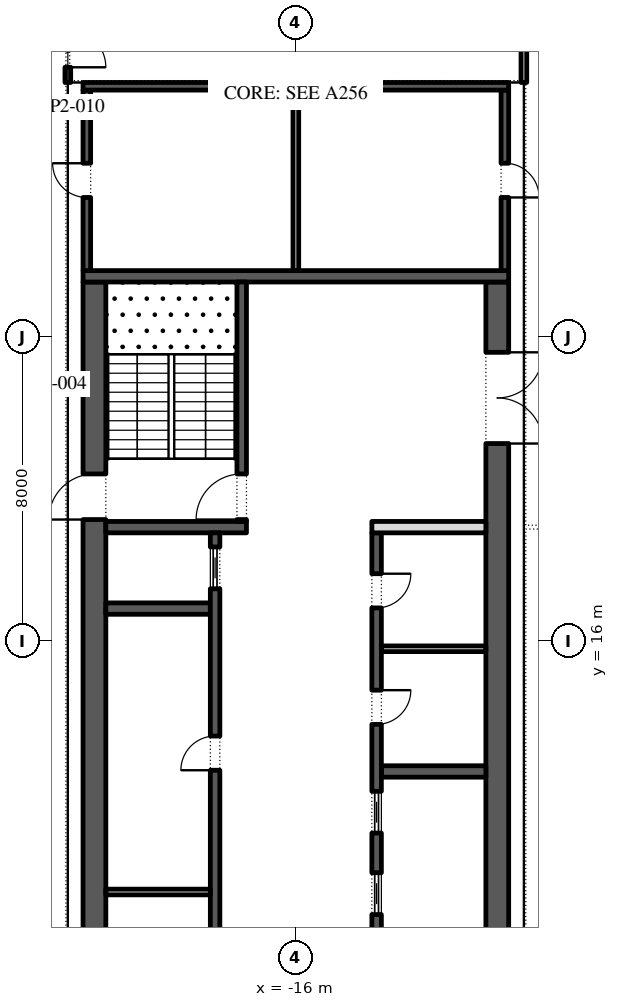
"""IFC4 building model, lengths in metres.
Left out: names, types, materials, properties, quantities, classifications, styles, units other than length and angle.
Written with IfcOpenShell. Run it as: python <this file> out.ifc"""

import sys

from ifc_helpers import new_model, si_unit, direction, frame, frame_2d, origin, place, context, subcontext, project, spatial, rectangle, extrude, element, fill, save


model = new_model("IFC4")
c1 = context("Model", 3, precision=1e-05, world=origin(), true_north=direction((0.0, 1.0)))
c2 = subcontext(c1, "Body", "Model", "MODEL_VIEW")
j1 = project(units=[si_unit("LENGTHUNIT", "METRE"), si_unit("PLANEANGLEUNIT", "RADIAN")], contexts=[c1])
p1 = place(None, origin())
s1 = spatial("IfcSite", under=j1, at=p1, CompositionType="ELEMENT")
p2 = place(p1, origin())
s2 = spatial("IfcBuilding", under=s1, at=p2, CompositionType="ELEMENT")
p3 = place(p2, frame((0.0, 0.0, 247.2)))
s3 = spatial("IfcBuildingStorey", under=s2, at=p3, CompositionType="ELEMENT", Elevation=247.2)
p4 = place(p3, frame((-21.359, 48.678, 0.0), z_axis=(0.0, 0.0, 1.0), x_axis=(-0.224949198343, -0.974370493275, 0.0)))
e1 = element("IfcWall", 1, at=p4, inside=s3, PredefinedType="STANDARD", context=c2, shape_type="SweptSolid", body=[
    extrude(rectangle(XDim=49.5, YDim=0.3, at=frame_2d((24.75, 0.0))), origin(), (0.0, 0.0, 1.0), 4.0),
])
p5 = place(p4, frame((1.157, 0.0, 0.45)))
e2 = element("IfcOpeningElement", 2, at=p5, cuts=e1, PredefinedType="OPENING", context=c2, shape_type="SweptSolid", body=[
    extrude(rectangle(XDim=4.5, YDim=3.05, at=frame_2d((2.25, 1.525))), frame((0.0, 0.16, 0.0), z_axis=(0.0, -1.0, 0.0), x_axis=(1.0, 0.0, 0.0)), (0.0, 0.0, 1.0), 0.32),
])
p6 = place(p4, frame((9.171, 0.0, 0.0)))
e3 = element("IfcOpeningElement", 3, at=p6, cuts=e1, PredefinedType="OPENING", context=c2, shape_type="SweptSolid", body=[
    extrude(rectangle(XDim=2.4, YDim=3.5, at=frame_2d((1.2, 1.75))), frame((0.0, 0.16, 0.0), z_axis=(0.0, -1.0, 0.0), x_axis=(1.0, 0.0, 0.0)), (0.0, 0.0, 1.0), 0.32),
])
p7 = place(p4, frame((15.236, 0.0, 0.45)))
e4 = element("IfcOpeningElement", 4, at=p7, cuts=e1, PredefinedType="OPENING", context=c2, shape_type="SweptSolid", body=[
    extrude(rectangle(XDim=4.5, YDim=3.05, at=frame_2d((2.25, 1.525))), frame((0.0, 0.16, 0.0), z_axis=(0.0, -1.0, 0.0), x_axis=(1.0, 0.0, 0.0)), (0.0, 0.0, 1.0), 0.32),
])
p8 = place(p4, frame((22.35, 0.0, 0.45)))
e5 = element("IfcOpeningElement", 5, at=p8, cuts=e1, PredefinedType="OPENING", context=c2, shape_type="SweptSolid", body=[
    extrude(rectangle(XDim=4.5, YDim=3.05, at=frame_2d((2.25, 1.525))), frame((0.0, 0.16, 0.0), z_axis=(0.0, -1.0, 0.0), x_axis=(1.0, 0.0, 0.0)), (0.0, 0.0, 1.0), 0.32),
])
p9 = place(p4, frame((29.464, 0.0, 0.45)))
e6 = element("IfcOpeningElement", 6, at=p9, cuts=e1, PredefinedType="OPENING", context=c2, shape_type="SweptSolid", body=[
    extrude(rectangle(XDim=4.5, YDim=3.05, at=frame_2d((2.25, 1.525))), frame((0.0, 0.16, 0.0), z_axis=(0.0, -1.0, 0.0), x_axis=(1.0, 0.0, 0.0)), (0.0, 0.0, 1.0), 0.32),
])
p10 = place(p4, frame((37.628, 0.0, 0.0)))
e7 = element("IfcOpeningElement", 7, at=p10, cuts=e1, PredefinedType="OPENING", context=c2, shape_type="SweptSolid", body=[
    extrude(rectangle(XDim=2.4, YDim=3.325, at=frame_2d((1.2, 1.663))), frame((0.0, 0.16, 0.0), z_axis=(0.0, -1.0, 0.0), x_axis=(1.0, 0.0, 0.0)), (0.0, 0.0, 1.0), 0.32),
])
p11 = place(p4, frame((43.693, 0.0, 0.45)))
e8 = element("IfcOpeningElement", 8, at=p11, cuts=e1, PredefinedType="OPENING", context=c2, shape_type="SweptSolid", body=[
    extrude(rectangle(XDim=4.5, YDim=2.825, at=frame_2d((2.25, 1.413))), frame((0.0, 0.16, 0.0), z_axis=(0.0, -1.0, 0.0), x_axis=(1.0, 0.0, 0.0)), (0.0, 0.0, 1.0), 0.32),
])
p12 = place(p3, frame((-21.3, -2.45, 0.0), z_axis=(0.0, 0.0, 1.0), x_axis=(0.0, 1.0, 0.0)))
e9 = element("IfcWall", 9, at=p12, inside=s3, PredefinedType="SHEAR", context=c2, shape_type="SweptSolid", body=[
    extrude(rectangle(XDim=27.9, YDim=0.6, at=frame_2d((13.95, 0.0))), origin(), (0.0, 0.0, 1.0), 4.0),
])
p13 = place(p12, frame((5.05, 0.0, 0.0)))
e10 = element("IfcOpeningElement", 10, at=p13, cuts=e9, PredefinedType="OPENING", context=c2, shape_type="SweptSolid", body=[
    extrude(rectangle(XDim=1.2, YDim=2.1, at=frame_2d((0.6, 1.05))), frame((0.0, 0.31, 0.0), z_axis=(0.0, -1.0, 0.0), x_axis=(1.0, 0.0, 0.0)), (0.0, 0.0, 1.0), 0.62),
])
p14 = place(p12, frame((21.65, 0.0, 0.0)))
e11 = element("IfcOpeningElement", 11, at=p14, cuts=e9, PredefinedType="OPENING", context=c2, shape_type="SweptSolid", body=[
    extrude(rectangle(XDim=1.2, YDim=2.1, at=frame_2d((0.6, 1.05))), frame((0.0, 0.31, 0.0), z_axis=(0.0, -1.0, 0.0), x_axis=(1.0, 0.0, 0.0)), (0.0, 0.0, 1.0), 0.62),
])
p15 = place(p3, frame((-10.7, -2.45, 0.0), z_axis=(0.0, 0.0, 1.0), x_axis=(0.0, 1.0, 0.0)))
e12 = element("IfcWall", 12, at=p15, inside=s3, PredefinedType="SHEAR", context=c2, shape_type="SweptSolid", body=[
    extrude(rectangle(XDim=27.9, YDim=0.6, at=frame_2d((13.95, 0.0))), origin(), (0.0, 0.0, 1.0), 4.0),
])
p16 = place(p15, frame((23.65, 0.0, 0.0)))
e13 = element("IfcOpeningElement", 13, at=p16, cuts=e12, PredefinedType="OPENING", context=c2, shape_type="SweptSolid", body=[
    extrude(rectangle(XDim=2.4, YDim=2.1, at=frame_2d((1.2, 1.05))), frame((0.0, 0.31, 0.0), z_axis=(0.0, -1.0, 0.0), x_axis=(1.0, 0.0, 0.0)), (0.0, 0.0, 1.0), 0.62),
])
p17 = place(p15, frame((1.087, 0.0, 0.0)))
e14 = element("IfcOpeningElement", 14, at=p17, cuts=e12, PredefinedType="OPENING", context=c2, shape_type="SweptSolid", body=[
    extrude(rectangle(XDim=0.9, YDim=2.1, at=frame_2d((0.45, 1.05))), frame((0.0, 0.31, 0.0), z_axis=(0.0, -1.0, 0.0), x_axis=(1.0, 0.0, 0.0)), (0.0, 0.0, 1.0), 0.62),
])
p18 = place(p15, frame((4.262, 0.0, 0.0)))
e15 = element("IfcOpeningElement", 15, at=p18, cuts=e12, PredefinedType="OPENING", context=c2, shape_type="SweptSolid", body=[
    extrude(rectangle(XDim=1.0, YDim=2.1, at=frame_2d((0.5, 1.05))), frame((0.0, 0.31, 0.0), z_axis=(0.0, -1.0, 0.0), x_axis=(1.0, 0.0, 0.0)), (0.0, 0.0, 1.0), 0.62),
])
p19 = place(p3, frame((-21.6, 25.6, 0.0), z_axis=(0.0, 0.0, 1.0), x_axis=(1.0, 0.0, 0.0)))
e16 = element("IfcWall", 16, at=p19, inside=s3, PredefinedType="SHEAR", context=c2, shape_type="SweptSolid", body=[
    extrude(rectangle(XDim=11.2, YDim=0.3, at=frame_2d((5.6, 0.0))), origin(), (0.0, 0.0, 1.0), 4.0),
])
p20 = place(p3, frame((-21.0, 19.0, 0.0), z_axis=(0.0, 0.0, 1.0), x_axis=(1.0, 0.0, 0.0)))
e17 = element("IfcWall", 17, at=p20, inside=s3, PredefinedType="SHEAR", context=c2, shape_type="SweptSolid", body=[
    extrude(rectangle(XDim=3.7, YDim=0.3, at=frame_2d((1.85, 0.0))), origin(), (0.0, 0.0, 1.0), 4.0),
])
p21 = place(p3, frame((-17.425, 19.15, 0.0), z_axis=(0.0, 0.0, 1.0), x_axis=(0.0, 1.0, 0.0)))
e18 = element("IfcWall", 18, at=p21, inside=s3, PredefinedType="SHEAR", context=c2, shape_type="SweptSolid", body=[
    extrude(rectangle(XDim=6.3, YDim=0.25, at=frame_2d((3.15, 0.0))), origin(), (0.0, 0.0, 1.0), 4.0),
])
p22 = place(p21, frame((0.05, 0.0, 0.0)))
e19 = element("IfcOpeningElement", 19, at=p22, cuts=e18, PredefinedType="OPENING", context=c2, shape_type="SweptSolid", body=[
    extrude(rectangle(XDim=1.2, YDim=2.1, at=frame_2d((0.6, 1.05))), frame((0.0, 0.135, 0.0), z_axis=(0.0, -1.0, 0.0), x_axis=(1.0, 0.0, 0.0)), (0.0, 0.0, 1.0), 0.27),
])
p23 = place(p3, frame((-21.0, 16.857, 0.0), z_axis=(0.0, 0.0, 1.0), x_axis=(1.0, 0.0, 0.0)))
e20 = element("IfcWall", 20, at=p23, inside=s3, PredefinedType="SHEAR", context=c2, shape_type="SweptSolid", body=[
    extrude(rectangle(XDim=2.75, YDim=0.3, at=frame_2d((1.375, 0.0))), origin(), (0.0, 0.0, 1.0), 4.0),
])
p24 = place(p3, frame((-18.125, 4.15, 0.0), z_axis=(0.0, 0.0, 1.0), x_axis=(0.0, 1.0, 0.0)))
e21 = element("IfcWall", 21, at=p24, inside=s3, PredefinedType="SHEAR", context=c2, shape_type="SweptSolid", body=[
    extrude(rectangle(XDim=14.7, YDim=0.25, at=frame_2d((7.35, 0.0))), origin(), (0.0, 0.0, 1.0), 4.0),
])
p25 = place(p24, frame((3.246, 0.0, 0.0)))
e22 = element("IfcOpeningElement", 22, at=p25, cuts=e21, PredefinedType="OPENING", context=c2, shape_type="SweptSolid", body=[
    extrude(rectangle(XDim=0.9, YDim=2.1, at=frame_2d((0.45, 1.05))), frame((0.0, 0.135, 0.0), z_axis=(0.0, -1.0, 0.0), x_axis=(1.0, 0.0, 0.0)), (0.0, 0.0, 1.0), 0.27),
])
p26 = place(p24, frame((8.454, 0.0, 0.0)))
e23 = element("IfcOpeningElement", 23, at=p26, cuts=e21, PredefinedType="OPENING", context=c2, shape_type="SweptSolid", body=[
    extrude(rectangle(XDim=0.9, YDim=2.1, at=frame_2d((0.45, 1.05))), frame((0.0, 0.135, 0.0), z_axis=(0.0, -1.0, 0.0), x_axis=(1.0, 0.0, 0.0)), (0.0, 0.0, 1.0), 0.27),
])
p27 = place(p24, frame((0.371, 0.0, 0.0)))
e24 = element("IfcOpeningElement", 24, at=p27, cuts=e21, PredefinedType="OPENING", context=c2, shape_type="SweptSolid", body=[
    extrude(rectangle(XDim=1.1, YDim=2.1, at=frame_2d((0.55, 1.05))), frame((0.0, 0.135, 0.0), z_axis=(0.0, -1.0, 0.0), x_axis=(1.0, 0.0, 0.0)), (0.0, 0.0, 1.0), 0.27),
])
p28 = place(p24, frame((13.229, 0.0, 0.0)))
e25 = element("IfcOpeningElement", 25, at=p28, cuts=e21, PredefinedType="OPENING", context=c2, shape_type="SweptSolid", body=[
    extrude(rectangle(XDim=1.1, YDim=2.1, at=frame_2d((0.55, 1.05))), frame((0.0, 0.135, 0.0), z_axis=(0.0, -1.0, 0.0), x_axis=(1.0, 0.0, 0.0)), (0.0, 0.0, 1.0), 0.27),
])
p29 = place(p3, frame((-21.0, 9.4, 0.0), z_axis=(0.0, 0.0, 1.0), x_axis=(1.0, 0.0, 0.0)))
e26 = element("IfcWall", 26, at=p29, inside=s3, PredefinedType="PARTITIONING", context=c2, shape_type="SweptSolid", body=[
    extrude(rectangle(XDim=2.75, YDim=0.15, at=frame_2d((1.375, 0.0))), origin(), (0.0, 0.0, 1.0), 4.0),
])
p30 = place(p3, frame((-13.75, 12.571, 0.0), z_axis=(0.0, 0.0, 1.0), x_axis=(1.0, 0.0, 0.0)))
e27 = element("IfcWall", 27, at=p30, inside=s3, PredefinedType="SHEAR", context=c2, shape_type="SweptSolid", body=[
    extrude(rectangle(XDim=2.75, YDim=0.3, at=frame_2d((1.375, 0.0))), origin(), (0.0, 0.0, 1.0), 4.0),
])
p31 = place(p3, frame((-13.875, -2.45, 0.0), z_axis=(0.0, 0.0, 1.0), x_axis=(0.0, 1.0, 0.0)))
e28 = element("IfcWall", 28, at=p31, inside=s3, PredefinedType="SHEAR", context=c2, shape_type="SweptSolid", body=[
    extrude(rectangle(XDim=21.3, YDim=0.25, at=frame_2d((10.65, 0.0))), origin(), (0.0, 0.0, 1.0), 4.0),
])
p32 = place(p31, frame((16.261, 0.0, 0.0)))
e29 = element("IfcOpeningElement", 29, at=p32, cuts=e28, PredefinedType="OPENING", context=c2, shape_type="SweptSolid", body=[
    extrude(rectangle(XDim=0.9, YDim=2.1, at=frame_2d((0.45, 1.05))), frame((0.0, 0.135, 0.0), z_axis=(0.0, -1.0, 0.0), x_axis=(1.0, 0.0, 0.0)), (0.0, 0.0, 1.0), 0.27),
])
p33 = place(p31, frame((19.325, 0.0, 0.0)))
e30 = element("IfcOpeningElement", 30, at=p33, cuts=e28, PredefinedType="OPENING", context=c2, shape_type="SweptSolid", body=[
    extrude(rectangle(XDim=0.9, YDim=2.1, at=frame_2d((0.45, 1.05))), frame((0.0, 0.135, 0.0), z_axis=(0.0, -1.0, 0.0), x_axis=(1.0, 0.0, 0.0)), (0.0, 0.0, 1.0), 0.27),
])
p34 = place(p31, frame((6.971, 0.0, 0.0)))
e31 = element("IfcOpeningElement", 31, at=p34, cuts=e28, PredefinedType="OPENING", context=c2, shape_type="SweptSolid", body=[
    extrude(rectangle(XDim=1.1, YDim=2.1, at=frame_2d((0.55, 1.05))), frame((0.0, 0.135, 0.0), z_axis=(0.0, -1.0, 0.0), x_axis=(1.0, 0.0, 0.0)), (0.0, 0.0, 1.0), 0.27),
])
p35 = place(p31, frame((9.114, 0.0, 0.0)))
e32 = element("IfcOpeningElement", 32, at=p35, cuts=e28, PredefinedType="OPENING", context=c2, shape_type="SweptSolid", body=[
    extrude(rectangle(XDim=1.1, YDim=2.1, at=frame_2d((0.55, 1.05))), frame((0.0, 0.135, 0.0), z_axis=(0.0, -1.0, 0.0), x_axis=(1.0, 0.0, 0.0)), (0.0, 0.0, 1.0), 0.27),
])
p36 = place(p31, frame((11.257, 0.0, 0.0)))
e33 = element("IfcOpeningElement", 33, at=p36, cuts=e28, PredefinedType="OPENING", context=c2, shape_type="SweptSolid", body=[
    extrude(rectangle(XDim=1.1, YDim=2.1, at=frame_2d((0.55, 1.05))), frame((0.0, 0.135, 0.0), z_axis=(0.0, -1.0, 0.0), x_axis=(1.0, 0.0, 0.0)), (0.0, 0.0, 1.0), 0.27),
])
p37 = place(p31, frame((13.4, 0.0, 0.0)))
e34 = element("IfcOpeningElement", 34, at=p37, cuts=e28, PredefinedType="OPENING", context=c2, shape_type="SweptSolid", body=[
    extrude(rectangle(XDim=1.1, YDim=2.1, at=frame_2d((0.55, 1.05))), frame((0.0, 0.135, 0.0), z_axis=(0.0, -1.0, 0.0), x_axis=(1.0, 0.0, 0.0)), (0.0, 0.0, 1.0), 0.27),
])
p38 = place(p3, frame((-14.0, 19.0, 0.0), z_axis=(0.0, 0.0, 1.0), x_axis=(1.0, 0.0, 0.0)))
e35 = element("IfcWall", 35, at=p38, inside=s3, PredefinedType="PARTITIONING", context=c2, shape_type="SweptSolid", body=[
    extrude(rectangle(XDim=3.0, YDim=0.3, at=frame_2d((1.5, 0.0))), origin(), (0.0, 0.0, 1.0), 4.0),
])
p39 = place(p3, frame((-13.75, 15.8, 0.0), z_axis=(0.0, 0.0, 1.0), x_axis=(1.0, 0.0, 0.0)))
e36 = element("IfcWall", 36, at=p39, inside=s3, PredefinedType="PARTITIONING", context=c2, shape_type="SweptSolid", body=[
    extrude(rectangle(XDim=2.75, YDim=0.15, at=frame_2d((1.375, 0.0))), origin(), (0.0, 0.0, 1.0), 4.0),
])
p40 = place(p3, frame((-21.5, 25.75, 0.0), z_axis=(0.0, 0.0, 1.0), x_axis=(0.0, 1.0, 0.0)))
e37 = element("IfcWall", 37, at=p40, inside=s3, PredefinedType="SHEAR", context=c2, shape_type="SweptSolid", body=[
    extrude(rectangle(XDim=4.75, YDim=0.2, at=frame_2d((2.375, 0.0))), origin(), (0.0, 0.0, 1.0), 4.0),
])
p41 = place(p40, frame((1.925, 0.0, 0.0)))
e38 = element("IfcOpeningElement", 38, at=p41, cuts=e37, PredefinedType="OPENING", context=c2, shape_type="SweptSolid", body=[
    extrude(rectangle(XDim=0.9, YDim=2.1, at=frame_2d((0.45, 1.05))), frame((0.0, 0.11, 0.0), z_axis=(0.0, -1.0, 0.0), x_axis=(1.0, 0.0, 0.0)), (0.0, 0.0, 1.0), 0.22),
])
p42 = place(p3, frame((-10.5, 25.75, 0.0), z_axis=(0.0, 0.0, 1.0), x_axis=(0.0, 1.0, 0.0)))
e39 = element("IfcWall", 39, at=p42, inside=s3, PredefinedType="SHEAR", context=c2, shape_type="SweptSolid", body=[
    extrude(rectangle(XDim=4.75, YDim=0.2, at=frame_2d((2.375, 0.0))), origin(), (0.0, 0.0, 1.0), 4.0),
])
p43 = place(p42, frame((1.925, 0.0, 0.0)))
e40 = element("IfcOpeningElement", 40, at=p43, cuts=e39, PredefinedType="OPENING", context=c2, shape_type="SweptSolid", body=[
    extrude(rectangle(XDim=0.9, YDim=2.1, at=frame_2d((0.45, 1.05))), frame((0.0, 0.11, 0.0), z_axis=(0.0, -1.0, 0.0), x_axis=(1.0, 0.0, 0.0)), (0.0, 0.0, 1.0), 0.22),
])
p44 = place(p3, frame((-21.6, 30.6, 0.0), z_axis=(0.0, 0.0, 1.0), x_axis=(1.0, 0.0, 0.0)))
e41 = element("IfcWall", 41, at=p44, inside=s3, PredefinedType="SHEAR", context=c2, shape_type="SweptSolid", body=[
    extrude(rectangle(XDim=11.2, YDim=0.2, at=frame_2d((5.6, 0.0))), origin(), (0.0, 0.0, 1.0), 4.0),
])
p45 = place(p3, frame((-16.0, 25.75, 0.0), z_axis=(0.0, 0.0, 1.0), x_axis=(0.0, 1.0, 0.0)))
e42 = element("IfcWall", 42, at=p45, inside=s3, PredefinedType="PARTITIONING", context=c2, shape_type="SweptSolid", body=[
    extrude(rectangle(XDim=4.75, YDim=0.15, at=frame_2d((2.375, 0.0))), origin(), (0.0, 0.0, 1.0), 4.0),
])
p46 = place(p3, frame((-22.0, 32.625, 0.0), z_axis=(0.0, 0.0, 1.0), x_axis=(0.0, -1.0, 0.0)))
e43 = element("IfcWall", 43, at=p46, inside=s3, PredefinedType="PARTITIONING", context=c2, shape_type="SweptSolid", body=[
    extrude(rectangle(XDim=1.925, YDim=0.15, at=frame_2d((0.962, 0.0))), origin(), (0.0, 0.0, 1.0), 4.0),
])
p47 = place(p46, frame((0.525, 0.0, 0.0)))
e44 = element("IfcOpeningElement", 44, at=p47, cuts=e43, PredefinedType="OPENING", context=c2, shape_type="SweptSolid", body=[
    extrude(rectangle(XDim=1.0, YDim=2.1, at=frame_2d((0.5, 1.05))), frame((0.0, 0.085, 0.0), z_axis=(0.0, -1.0, 0.0), x_axis=(1.0, 0.0, 0.0)), (0.0, 0.0, 1.0), 0.17),
])
p48 = place(p3, frame((-10.0, 30.7, 0.0), z_axis=(0.0, 0.0, 1.0), x_axis=(0.0, 1.0, 0.0)))
e45 = element("IfcWall", 45, at=p48, inside=s3, PredefinedType="PARTITIONING", context=c2, shape_type="SweptSolid", body=[
    extrude(rectangle(XDim=2.075, YDim=0.15, at=frame_2d((1.038, 0.0))), origin(), (0.0, 0.0, 1.0), 3.02),
])
p49 = place(p26, origin())
e46 = element("IfcDoor", 46, at=p49, inside=s3, OperationType="SINGLE_SWING_RIGHT", PredefinedType="DOOR", context=c2, shape_type="SweptSolid", body=[
    extrude(rectangle(XDim=0.9, YDim=2.1, at=frame_2d((0.45, 1.05))), frame((0.0, 0.125, 0.0), z_axis=(0.0, -1.0, 0.0), x_axis=(1.0, 0.0, 0.0)), (0.0, 0.0, 1.0), 0.05),
])
fill(e23, e46)
p50 = place(p28, origin())
e47 = element("IfcDoor", 47, at=p50, inside=s3, OperationType="SLIDING_TO_LEFT", PredefinedType="DOOR", context=c2, shape_type="SweptSolid", body=[
    extrude(rectangle(XDim=1.1, YDim=2.1, at=frame_2d((0.55, 1.05))), frame((0.0, 0.025, 0.0), z_axis=(0.0, -1.0, 0.0), x_axis=(1.0, 0.0, 0.0)), (0.0, 0.0, 1.0), 0.05),
])
fill(e25, e47)
p51 = place(p32, frame((0.9, -0.2, 0.0), z_axis=(0.0, 0.0, 1.0), x_axis=(-1.0, 0.0, 0.0)))
e48 = element("IfcDoor", 48, at=p51, inside=s3, OperationType="SINGLE_SWING_RIGHT", PredefinedType="DOOR", context=c2, shape_type="SweptSolid", body=[
    extrude(rectangle(XDim=0.9, YDim=2.1, at=frame_2d((0.45, 1.05))), frame((0.0, -0.075, 0.0), z_axis=(0.0, -1.0, 0.0), x_axis=(1.0, 0.0, 0.0)), (0.0, 0.0, 1.0), 0.05),
])
fill(e29, e48)
p52 = place(p33, frame((0.9, -0.2, 0.0), z_axis=(0.0, 0.0, 1.0), x_axis=(-1.0, 0.0, 0.0)))
e49 = element("IfcDoor", 49, at=p52, inside=s3, OperationType="SINGLE_SWING_RIGHT", PredefinedType="DOOR", context=c2, shape_type="SweptSolid", body=[
    extrude(rectangle(XDim=0.9, YDim=2.1, at=frame_2d((0.45, 1.05))), frame((0.0, -0.075, 0.0), z_axis=(0.0, -1.0, 0.0), x_axis=(1.0, 0.0, 0.0)), (0.0, 0.0, 1.0), 0.05),
])
fill(e30, e49)
p53 = place(p36, origin())
e50 = element("IfcDoor", 50, at=p53, inside=s3, OperationType="SLIDING_TO_LEFT", PredefinedType="DOOR", context=c2, shape_type="SweptSolid", body=[
    extrude(rectangle(XDim=1.1, YDim=2.1, at=frame_2d((0.55, 1.05))), frame((0.0, 0.025, 0.0), z_axis=(0.0, -1.0, 0.0), x_axis=(1.0, 0.0, 0.0)), (0.0, 0.0, 1.0), 0.05),
])
fill(e33, e50)
p54 = place(p37, origin())
e51 = element("IfcDoor", 51, at=p54, inside=s3, OperationType="SLIDING_TO_LEFT", PredefinedType="DOOR", context=c2, shape_type="SweptSolid", body=[
    extrude(rectangle(XDim=1.1, YDim=2.1, at=frame_2d((0.55, 1.05))), frame((0.0, 0.025, 0.0), z_axis=(0.0, -1.0, 0.0), x_axis=(1.0, 0.0, 0.0)), (0.0, 0.0, 1.0), 0.05),
])
fill(e34, e51)
p55 = place(p16, frame((2.4, 0.0, 0.0), z_axis=(0.0, 0.0, 1.0), x_axis=(-1.0, 0.0, 0.0)))
e52 = element("IfcDoor", 52, at=p55, inside=s3, OperationType="DOUBLE_DOOR_SINGLE_SWING", PredefinedType="DOOR", context=c2, shape_type="SweptSolid", body=[
    extrude(rectangle(XDim=2.4, YDim=2.1, at=frame_2d((1.2, 1.05))), frame((0.0, 0.025, 0.0), z_axis=(0.0, -1.0, 0.0), x_axis=(1.0, 0.0, 0.0)), (0.0, 0.0, 1.0), 0.05),
])
fill(e13, e52)
p56 = place(p22, origin())
e53 = element("IfcDoor", 53, at=p56, inside=s3, OperationType="SINGLE_SWING_RIGHT", PredefinedType="DOOR", context=c2, shape_type="SweptSolid", body=[
    extrude(rectangle(XDim=1.2, YDim=2.1, at=frame_2d((0.6, 1.05))), frame((0.0, 0.025, 0.0), z_axis=(0.0, -1.0, 0.0), x_axis=(1.0, 0.0, 0.0)), (0.0, 0.0, 1.0), 0.05),
])
fill(e19, e53)
p57 = place(p14, origin())
e54 = element("IfcDoor", 54, at=p57, inside=s3, OperationType="SINGLE_SWING_RIGHT", PredefinedType="DOOR", context=c2, shape_type="SweptSolid", body=[
    extrude(rectangle(XDim=1.2, YDim=2.1, at=frame_2d((0.6, 1.05))), frame((0.0, 0.025, 0.0), z_axis=(0.0, -1.0, 0.0), x_axis=(1.0, 0.0, 0.0)), (0.0, 0.0, 1.0), 0.05),
])
fill(e11, e54)
p58 = place(p41, origin())
e55 = element("IfcDoor", 55, at=p58, inside=s3, OperationType="SINGLE_SWING_LEFT", PredefinedType="DOOR", context=c2, shape_type="SweptSolid", body=[
    extrude(rectangle(XDim=0.9, YDim=2.1, at=frame_2d((0.45, 1.05))), frame((0.0, -0.05, 0.0), z_axis=(0.0, -1.0, 0.0), x_axis=(1.0, 0.0, 0.0)), (0.0, 0.0, 1.0), 0.05),
])
fill(e38, e55)
p59 = place(p43, frame((0.9, 0.15, 0.0), z_axis=(0.0, 0.0, 1.0), x_axis=(-1.0, 0.0, 0.0)))
e56 = element("IfcDoor", 56, at=p59, inside=s3, OperationType="SINGLE_SWING_LEFT", PredefinedType="DOOR", context=c2, shape_type="SweptSolid", body=[
    extrude(rectangle(XDim=0.9, YDim=2.1, at=frame_2d((0.45, 1.05))), frame((0.0, 0.1, 0.0), z_axis=(0.0, -1.0, 0.0), x_axis=(1.0, 0.0, 0.0)), (0.0, 0.0, 1.0), 0.05),
])
fill(e40, e56)
p60 = place(p47, origin())
e57 = element("IfcDoor", 57, at=p60, inside=s3, OperationType="SINGLE_SWING_LEFT", PredefinedType="DOOR", context=c2, shape_type="SweptSolid", body=[
    extrude(rectangle(XDim=1.0, YDim=2.1, at=frame_2d((0.5, 1.05))), frame((0.0, 0.025, 0.0), z_axis=(0.0, -1.0, 0.0), x_axis=(1.0, 0.0, 0.0)), (0.0, 0.0, 1.0), 0.05),
])
fill(e44, e57)
save(model, sys.argv[1])
